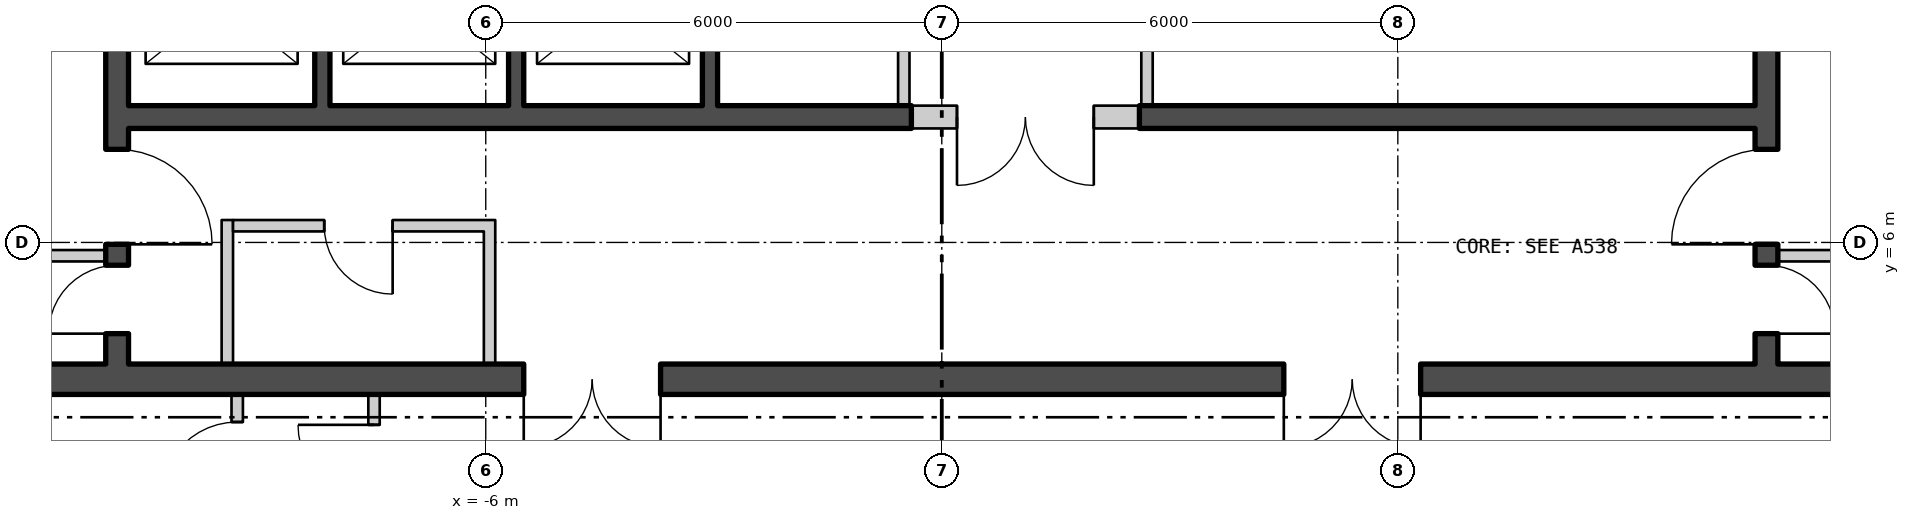
"""IFC4 building model, lengths in metres.
Left out: names, types, materials, properties, quantities, classifications, styles, units other than length and angle.
Written with IfcOpenShell. Run it as: python <this file> out.ifc"""

import sys

from ifc_helpers import new_model, si_unit, direction, frame, frame_2d, origin, place, context, subcontext, project, spatial, polyline, rectangle, outline, extrude, element, fill, save


model = new_model("IFC4")
c1 = context("Model", 3, precision=1e-05, world=origin(), true_north=direction((0.0, 1.0)))
c2 = subcontext(c1, "Body", "Model", "MODEL_VIEW")
j1 = project(units=[si_unit("LENGTHUNIT", "METRE"), si_unit("PLANEANGLEUNIT", "RADIAN")], contexts=[c1])
p1 = place(None, origin())
s1 = spatial("IfcSite", under=j1, at=p1, CompositionType="ELEMENT")
p2 = place(p1, origin())
s2 = spatial("IfcBuilding", under=s1, at=p2, CompositionType="ELEMENT")
p3 = place(p2, frame((0.0, 0.0, 321.0)))
s3 = spatial("IfcBuildingStorey", under=s2, at=p3, CompositionType="ELEMENT", Elevation=321.0)
p4 = place(p3, frame((-24.875, 16.493, -0.18), z_axis=(0.0, 0.0, 1.0), x_axis=(0.500000141277, -0.866025322218, 0.0)))
e1 = element("IfcWall", 1, at=p4, inside=s3, PredefinedType="SOLIDWALL", context=c2, shape_type="SweptSolid", body=[
    extrude(outline(polyline([(-0.13, -0.225), (45.86, -0.225), (45.6, 0.225), (0.13, 0.225), (-0.13, -0.225)])), origin(), (0.0, 0.0, 1.0), 3.98),
])
p5 = place(p4, frame((1.424, 0.0, 1.08)))
e2 = element("IfcOpeningElement", 2, at=p5, cuts=e1, PredefinedType="OPENING", context=c2, shape_type="SweptSolid", body=[
    extrude(rectangle(XDim=2.4, YDim=2.3, at=frame_2d((1.2, 1.15))), frame((0.0, 0.235, 0.0), z_axis=(0.0, -1.0, 0.0), x_axis=(1.0, 0.0, 0.0)), (0.0, 0.0, 1.0), 0.47),
])
p6 = place(p4, frame((5.892, 0.0, 1.08)))
e3 = element("IfcOpeningElement", 3, at=p6, cuts=e1, PredefinedType="OPENING", context=c2, shape_type="SweptSolid", body=[
    extrude(rectangle(XDim=2.4, YDim=2.3, at=frame_2d((1.2, 1.15))), frame((0.0, 0.235, 0.0), z_axis=(0.0, -1.0, 0.0), x_axis=(1.0, 0.0, 0.0)), (0.0, 0.0, 1.0), 0.47),
])
p7 = place(p4, frame((10.399, 0.0, 1.08)))
e4 = element("IfcOpeningElement", 4, at=p7, cuts=e1, PredefinedType="OPENING", context=c2, shape_type="SweptSolid", body=[
    extrude(rectangle(XDim=2.4, YDim=2.3, at=frame_2d((1.2, 1.15))), frame((0.0, 0.235, 0.0), z_axis=(0.0, -1.0, 0.0), x_axis=(1.0, 0.0, 0.0)), (0.0, 0.0, 1.0), 0.47),
])
p8 = place(p4, frame((14.905, 0.0, 1.08)))
e5 = element("IfcOpeningElement", 5, at=p8, cuts=e1, PredefinedType="OPENING", context=c2, shape_type="SweptSolid", body=[
    extrude(rectangle(XDim=2.4, YDim=2.3, at=frame_2d((1.2, 1.15))), frame((0.0, 0.235, 0.0), z_axis=(0.0, -1.0, 0.0), x_axis=(1.0, 0.0, 0.0)), (0.0, 0.0, 1.0), 0.47),
])
p9 = place(p4, frame((19.412, 0.0, 1.08)))
e6 = element("IfcOpeningElement", 6, at=p9, cuts=e1, PredefinedType="OPENING", context=c2, shape_type="SweptSolid", body=[
    extrude(rectangle(XDim=2.4, YDim=2.3, at=frame_2d((1.2, 1.15))), frame((0.0, 0.235, 0.0), z_axis=(0.0, -1.0, 0.0), x_axis=(1.0, 0.0, 0.0)), (0.0, 0.0, 1.0), 0.47),
])
p10 = place(p4, frame((23.918, 0.0, 1.08)))
e7 = element("IfcOpeningElement", 7, at=p10, cuts=e1, PredefinedType="OPENING", context=c2, shape_type="SweptSolid", body=[
    extrude(rectangle(XDim=2.4, YDim=2.3, at=frame_2d((1.2, 1.15))), frame((0.0, 0.235, 0.0), z_axis=(0.0, -1.0, 0.0), x_axis=(1.0, 0.0, 0.0)), (0.0, 0.0, 1.0), 0.47),
])
p11 = place(p4, frame((28.425, 0.0, 1.08)))
e8 = element("IfcOpeningElement", 8, at=p11, cuts=e1, PredefinedType="OPENING", context=c2, shape_type="SweptSolid", body=[
    extrude(rectangle(XDim=2.4, YDim=2.3, at=frame_2d((1.2, 1.15))), frame((0.0, 0.235, 0.0), z_axis=(0.0, -1.0, 0.0), x_axis=(1.0, 0.0, 0.0)), (0.0, 0.0, 1.0), 0.47),
])
p12 = place(p4, frame((37.438, 0.0, 1.08)))
e9 = element("IfcOpeningElement", 9, at=p12, cuts=e1, PredefinedType="OPENING", context=c2, shape_type="SweptSolid", body=[
    extrude(rectangle(XDim=2.4, YDim=2.3, at=frame_2d((1.2, 1.15))), frame((0.0, 0.235, 0.0), z_axis=(0.0, -1.0, 0.0), x_axis=(1.0, 0.0, 0.0)), (0.0, 0.0, 1.0), 0.47),
])
p13 = place(p4, frame((41.907, 0.0, 1.08)))
e10 = element("IfcOpeningElement", 10, at=p13, cuts=e1, PredefinedType="OPENING", context=c2, shape_type="SweptSolid", body=[
    extrude(rectangle(XDim=2.4, YDim=2.3, at=frame_2d((1.2, 1.15))), frame((0.0, 0.235, 0.0), z_axis=(0.0, -1.0, 0.0), x_axis=(1.0, 0.0, 0.0)), (0.0, 0.0, 1.0), 0.47),
])
p14 = place(p3, frame((2.01, -23.11, -0.18), z_axis=(0.0, 0.0, 1.0), x_axis=(0.500000141277, 0.866025322218, 0.0)))
e11 = element("IfcWall", 11, at=p14, inside=s3, PredefinedType="SOLIDWALL", context=c2, shape_type="SweptSolid", body=[
    extrude(outline(polyline([(-0.13, -0.225), (45.86, -0.225), (45.6, 0.225), (0.13, 0.225), (-0.13, -0.225)])), origin(), (0.0, 0.0, 1.0), 3.98),
])
p15 = place(p14, frame((1.424, 0.0, 1.08)))
e12 = element("IfcOpeningElement", 12, at=p15, cuts=e11, PredefinedType="OPENING", context=c2, shape_type="SweptSolid", body=[
    extrude(rectangle(XDim=2.4, YDim=2.3, at=frame_2d((1.2, 1.15))), frame((0.0, 0.235, 0.0), z_axis=(0.0, -1.0, 0.0), x_axis=(1.0, 0.0, 0.0)), (0.0, 0.0, 1.0), 0.47),
])
p16 = place(p14, frame((5.892, 0.0, 1.08)))
e13 = element("IfcOpeningElement", 13, at=p16, cuts=e11, PredefinedType="OPENING", context=c2, shape_type="SweptSolid", body=[
    extrude(rectangle(XDim=2.4, YDim=2.3, at=frame_2d((1.2, 1.15))), frame((0.0, 0.235, 0.0), z_axis=(0.0, -1.0, 0.0), x_axis=(1.0, 0.0, 0.0)), (0.0, 0.0, 1.0), 0.47),
])
p17 = place(p14, frame((14.905, 0.0, 1.08)))
e14 = element("IfcOpeningElement", 14, at=p17, cuts=e11, PredefinedType="OPENING", context=c2, shape_type="SweptSolid", body=[
    extrude(rectangle(XDim=2.4, YDim=2.3, at=frame_2d((1.2, 1.15))), frame((0.0, 0.235, 0.0), z_axis=(0.0, -1.0, 0.0), x_axis=(1.0, 0.0, 0.0)), (0.0, 0.0, 1.0), 0.47),
])
p18 = place(p14, frame((19.412, 0.0, 1.08)))
e15 = element("IfcOpeningElement", 15, at=p18, cuts=e11, PredefinedType="OPENING", context=c2, shape_type="SweptSolid", body=[
    extrude(rectangle(XDim=2.4, YDim=2.3, at=frame_2d((1.2, 1.15))), frame((0.0, 0.235, 0.0), z_axis=(0.0, -1.0, 0.0), x_axis=(1.0, 0.0, 0.0)), (0.0, 0.0, 1.0), 0.47),
])
p19 = place(p14, frame((23.918, 0.0, 1.08)))
e16 = element("IfcOpeningElement", 16, at=p19, cuts=e11, PredefinedType="OPENING", context=c2, shape_type="SweptSolid", body=[
    extrude(rectangle(XDim=2.4, YDim=2.3, at=frame_2d((1.2, 1.15))), frame((0.0, 0.235, 0.0), z_axis=(0.0, -1.0, 0.0), x_axis=(1.0, 0.0, 0.0)), (0.0, 0.0, 1.0), 0.47),
])
p20 = place(p14, frame((28.425, 0.0, 1.08)))
e17 = element("IfcOpeningElement", 17, at=p20, cuts=e11, PredefinedType="OPENING", context=c2, shape_type="SweptSolid", body=[
    extrude(rectangle(XDim=2.4, YDim=2.3, at=frame_2d((1.2, 1.15))), frame((0.0, 0.235, 0.0), z_axis=(0.0, -1.0, 0.0), x_axis=(1.0, 0.0, 0.0)), (0.0, 0.0, 1.0), 0.47),
])
p21 = place(p14, frame((37.438, 0.0, 1.08)))
e18 = element("IfcOpeningElement", 18, at=p21, cuts=e11, PredefinedType="OPENING", context=c2, shape_type="SweptSolid", body=[
    extrude(rectangle(XDim=2.4, YDim=2.3, at=frame_2d((1.2, 1.15))), frame((0.0, 0.235, 0.0), z_axis=(0.0, -1.0, 0.0), x_axis=(1.0, 0.0, 0.0)), (0.0, 0.0, 1.0), 0.47),
])
p22 = place(p14, frame((41.907, 0.0, 1.08)))
e19 = element("IfcOpeningElement", 19, at=p22, cuts=e11, PredefinedType="OPENING", context=c2, shape_type="SweptSolid", body=[
    extrude(rectangle(XDim=2.4, YDim=2.3, at=frame_2d((1.2, 1.15))), frame((0.0, 0.235, 0.0), z_axis=(0.0, -1.0, 0.0), x_axis=(1.0, 0.0, 0.0)), (0.0, 0.0, 1.0), 0.47),
])
p23 = place(p3, frame((-14.5, 4.2, 0.0), z_axis=(0.0, 0.0, 1.0), x_axis=(1.0, 0.0, 0.0)))
e20 = element("IfcWall", 20, at=p23, inside=s3, PredefinedType="SHEAR", context=c2, shape_type="SweptSolid", body=[
    extrude(rectangle(XDim=29.0, YDim=0.4, at=frame_2d((14.5, 0.0))), origin(), (0.0, 0.0, 1.0), 4.0),
])
p24 = place(p23, frame((9.0, 0.0, 0.0)))
e21 = element("IfcOpeningElement", 21, at=p24, cuts=e20, PredefinedType="OPENING", context=c2, shape_type="SweptSolid", body=[
    extrude(rectangle(XDim=1.8, YDim=2.4, at=frame_2d((0.9, 1.2))), frame((0.0, 0.21, 0.0), z_axis=(0.0, -1.0, 0.0), x_axis=(1.0, 0.0, 0.0)), (0.0, 0.0, 1.0), 0.42),
])
p25 = place(p23, frame((19.0, 0.0, 0.0)))
e22 = element("IfcOpeningElement", 22, at=p25, cuts=e20, PredefinedType="OPENING", context=c2, shape_type="SweptSolid", body=[
    extrude(rectangle(XDim=1.8, YDim=2.4, at=frame_2d((0.9, 1.2))), frame((0.0, 0.21, 0.0), z_axis=(0.0, -1.0, 0.0), x_axis=(1.0, 0.0, 0.0)), (0.0, 0.0, 1.0), 0.42),
])
p26 = place(p3, frame((-10.85, 4.4, 0.0), z_axis=(0.0, 0.0, 1.0), x_axis=(0.0, 1.0, 0.0)))
e23 = element("IfcWall", 23, at=p26, inside=s3, PredefinedType="SHEAR", context=c2, shape_type="SweptSolid", body=[
    extrude(rectangle(XDim=13.2, YDim=0.3, at=frame_2d((6.6, 0.0))), origin(), (0.0, 0.0, 1.0), 4.0),
])
p27 = place(p26, frame((1.575, 0.0, 0.0)))
e24 = element("IfcOpeningElement", 24, at=p27, cuts=e23, PredefinedType="OPENING", context=c2, shape_type="SweptSolid", body=[
    extrude(rectangle(XDim=1.25, YDim=2.1, at=frame_2d((0.625, 1.05))), frame((0.0, 0.16, 0.0), z_axis=(0.0, -1.0, 0.0), x_axis=(1.0, 0.0, 0.0)), (0.0, 0.0, 1.0), 0.32),
])
p28 = place(p26, frame((0.4, 0.0, 0.0)))
e25 = element("IfcOpeningElement", 25, at=p28, cuts=e23, PredefinedType="OPENING", context=c2, shape_type="SweptSolid", body=[
    extrude(rectangle(XDim=0.9, YDim=2.1, at=frame_2d((0.45, 1.05))), frame((0.0, 0.16, 0.0), z_axis=(0.0, -1.0, 0.0), x_axis=(1.0, 0.0, 0.0)), (0.0, 0.0, 1.0), 0.32),
])
p29 = place(p3, frame((10.85, 4.4, 0.0), z_axis=(0.0, 0.0, 1.0), x_axis=(0.0, 1.0, 0.0)))
e26 = element("IfcWall", 26, at=p29, inside=s3, PredefinedType="SHEAR", context=c2, shape_type="SweptSolid", body=[
    extrude(rectangle(XDim=13.2, YDim=0.3, at=frame_2d((6.6, 0.0))), origin(), (0.0, 0.0, 1.0), 4.0),
])
p30 = place(p29, frame((1.575, 0.0, 0.0)))
e27 = element("IfcOpeningElement", 27, at=p30, cuts=e26, PredefinedType="OPENING", context=c2, shape_type="SweptSolid", body=[
    extrude(rectangle(XDim=1.25, YDim=2.1, at=frame_2d((0.625, 1.05))), frame((0.0, 0.16, 0.0), z_axis=(0.0, -1.0, 0.0), x_axis=(1.0, 0.0, 0.0)), (0.0, 0.0, 1.0), 0.32),
])
p31 = place(p29, frame((0.4, 0.0, 0.0)))
e28 = element("IfcOpeningElement", 28, at=p31, cuts=e26, PredefinedType="OPENING", context=c2, shape_type="SweptSolid", body=[
    extrude(rectangle(XDim=0.9, YDim=2.1, at=frame_2d((0.45, 1.05))), frame((0.0, 0.16, 0.0), z_axis=(0.0, -1.0, 0.0), x_axis=(1.0, 0.0, 0.0)), (0.0, 0.0, 1.0), 0.32),
])
p32 = place(p3, frame((-10.7, 7.65, 0.0), z_axis=(0.0, 0.0, 1.0), x_axis=(1.0, 0.0, 0.0)))
e29 = element("IfcWall", 29, at=p32, inside=s3, PredefinedType="SHEAR", context=c2, shape_type="SweptSolid", body=[
    extrude(rectangle(XDim=10.3, YDim=0.3, at=frame_2d((5.15, 0.0))), origin(), (0.0, 0.0, 1.0), 4.0),
])
p33 = place(p3, frame((2.6, 7.65, 0.0), z_axis=(0.0, 0.0, 1.0), x_axis=(1.0, 0.0, 0.0)))
e30 = element("IfcWall", 30, at=p33, inside=s3, PredefinedType="SHEAR", context=c2, shape_type="SweptSolid", body=[
    extrude(rectangle(XDim=8.1, YDim=0.3, at=frame_2d((4.05, 0.0))), origin(), (0.0, 0.0, 1.0), 4.0),
])
for number, where, z_axis, x_axis in (
    (31, (-8.15, 7.8, 0.0), (0.0, 0.0, 1.0), (0.0, 1.0, 0.0)),
    (32, (-5.6, 7.8, 0.0), (0.0, 0.0, 1.0), (0.0, 1.0, 0.0)),
    (33, (-3.05, 7.8, 0.0), (0.0, 0.0, 1.0), (0.0, 1.0, 0.0)),
):
    element("IfcWall", number, at=place(p3, frame(where, z_axis=z_axis, x_axis=x_axis)), inside=s3, PredefinedType="SHEAR", context=c2, shape_type="SweptSolid", body=[
        extrude(rectangle(XDim=2.7, YDim=0.2, at=frame_2d((1.35, 0.0))), origin(), (0.0, 0.0, 1.0), 4.0),
    ])
for number, where, z_axis, x_axis in (
    (34, (-0.5, 7.8, 0.0), (0.0, 0.0, 1.0), (0.0, 1.0, 0.0)),
    (35, (2.7, 7.8, 0.0), (0.0, 0.0, 1.0), (0.0, 1.0, 0.0)),
):
    element("IfcWall", number, at=place(p3, frame(where, z_axis=z_axis, x_axis=x_axis)), inside=s3, PredefinedType="PARTITIONING", context=c2, shape_type="SweptSolid", body=[
        extrude(rectangle(XDim=2.7, YDim=0.15, at=frame_2d((1.35, 0.0))), origin(), (0.0, 0.0, 1.0), 4.0),
    ])
for number, where, z_axis, x_axis in (
    (36, (-14.1, 5.825, 0.0), (0.0, 0.0, 1.0), (1.0, 0.0, 0.0)),
    (37, (11.0, 5.825, 0.0), (0.0, 0.0, 1.0), (1.0, 0.0, 0.0)),
):
    element("IfcWall", number, at=place(p3, frame(where, z_axis=z_axis, x_axis=x_axis)), inside=s3, PredefinedType="PARTITIONING", context=c2, shape_type="SweptSolid", body=[
        extrude(rectangle(XDim=3.1, YDim=0.15, at=frame_2d((1.55, 0.0))), origin(), (0.0, 0.0, 1.0), 4.0),
    ])
for number, where, z_axis, x_axis in (
    (38, (-9.4, 4.4, 0.0), (0.0, 0.0, 1.0), (0.0, 1.0, 0.0)),
    (39, (-5.95, 4.4, 0.0), (0.0, 0.0, 1.0), (0.0, 1.0, 0.0)),
):
    element("IfcWall", number, at=place(p3, frame(where, z_axis=z_axis, x_axis=x_axis)), inside=s3, PredefinedType="PARTITIONING", context=c2, shape_type="SweptSolid", body=[
        extrude(rectangle(XDim=1.895, YDim=0.15, at=frame_2d((0.948, 0.0))), origin(), (0.0, 0.0, 1.0), 4.0),
    ])
p34 = place(p3, frame((-9.325, 6.22, 0.0), z_axis=(0.0, 0.0, 1.0), x_axis=(1.0, 0.0, 0.0)))
e40 = element("IfcWall", 40, at=p34, inside=s3, PredefinedType="PARTITIONING", context=c2, shape_type="SweptSolid", body=[
    extrude(rectangle(XDim=3.3, YDim=0.15, at=frame_2d((1.65, 0.0))), origin(), (0.0, 0.0, 1.0), 4.0),
])
p35 = place(p34, frame((1.2, 0.0, 0.0)))
e41 = element("IfcOpeningElement", 41, at=p35, cuts=e40, PredefinedType="OPENING", context=c2, shape_type="SweptSolid", body=[
    extrude(rectangle(XDim=0.9, YDim=2.1, at=frame_2d((0.45, 1.05))), frame((0.0, 0.085, 0.0), z_axis=(0.0, -1.0, 0.0), x_axis=(1.0, 0.0, 0.0)), (0.0, 0.0, 1.0), 0.17),
])
p36 = place(p3, frame((-0.4, 7.65, 0.0), z_axis=(0.0, 0.0, 1.0), x_axis=(1.0, 0.0, 0.0)))
e42 = element("IfcWall", 42, at=p36, inside=s3, PredefinedType="PARTITIONING", context=c2, shape_type="SweptSolid", body=[
    extrude(rectangle(XDim=3.0, YDim=0.3, at=frame_2d((1.5, 0.0))), origin(), (0.0, 0.0, 1.0), 4.0),
])
p37 = place(p36, frame((0.6, 0.0, 0.0)))
e43 = element("IfcOpeningElement", 43, at=p37, cuts=e42, PredefinedType="OPENING", context=c2, shape_type="SweptSolid", body=[
    extrude(rectangle(XDim=1.8, YDim=2.4, at=frame_2d((0.9, 1.2))), frame((0.0, 0.16, 0.0), z_axis=(0.0, -1.0, 0.0), x_axis=(1.0, 0.0, 0.0)), (0.0, 0.0, 1.0), 0.32),
])
p38 = place(p3, frame((-9.27, 2.275, 0.0), z_axis=(0.0, 0.0, 1.0), x_axis=(0.0, 1.0, 0.0)))
e44 = element("IfcWall", 44, at=p38, inside=s3, PredefinedType="PARTITIONING", context=c2, shape_type="SweptSolid", body=[
    extrude(rectangle(XDim=1.725, YDim=0.15, at=frame_2d((0.863, 0.0))), origin(), (0.0, 0.0, 1.0), 4.0),
])
p39 = place(p38, frame((0.362, 0.0, 0.0)))
e45 = element("IfcOpeningElement", 45, at=p39, cuts=e44, PredefinedType="OPENING", context=c2, shape_type="SweptSolid", body=[
    extrude(rectangle(XDim=1.0, YDim=2.1, at=frame_2d((0.5, 1.05))), frame((0.0, 0.085, 0.0), z_axis=(0.0, -1.0, 0.0), x_axis=(1.0, 0.0, 0.0)), (0.0, 0.0, 1.0), 0.17),
])
p40 = place(p3, frame((-7.47, -13.203, 0.0), z_axis=(0.0, 0.0, 1.0), x_axis=(0.0, 1.0, 0.0)))
e46 = element("IfcWall", 46, at=p40, inside=s3, PredefinedType="PARTITIONING", context=c2, shape_type="SweptSolid", body=[
    extrude(rectangle(XDim=17.203, YDim=0.15, at=frame_2d((8.601, 0.0))), origin(), (0.0, 0.0, 1.0), 4.0),
])
p41 = place(p40, frame((3.519, 0.0, 0.0)))
e47 = element("IfcOpeningElement", 47, at=p41, cuts=e46, PredefinedType="OPENING", context=c2, shape_type="SweptSolid", body=[
    extrude(rectangle(XDim=1.0, YDim=2.1, at=frame_2d((0.5, 1.05))), frame((0.0, 0.085, 0.0), z_axis=(0.0, -1.0, 0.0), x_axis=(1.0, 0.0, 0.0)), (0.0, 0.0, 1.0), 0.17),
])
p42 = place(p40, frame((15.803, 0.0, 0.0)))
e48 = element("IfcOpeningElement", 48, at=p42, cuts=e46, PredefinedType="OPENING", context=c2, shape_type="SweptSolid", body=[
    extrude(rectangle(XDim=1.0, YDim=2.1, at=frame_2d((0.5, 1.05))), frame((0.0, 0.085, 0.0), z_axis=(0.0, -1.0, 0.0), x_axis=(1.0, 0.0, 0.0)), (0.0, 0.0, 1.0), 0.17),
])
p43 = place(p27, origin())
e49 = element("IfcDoor", 49, at=p43, inside=s3, OperationType="SINGLE_SWING_LEFT", PredefinedType="DOOR", context=c2, shape_type="SweptSolid", body=[
    extrude(rectangle(XDim=1.25, YDim=2.1, at=frame_2d((0.625, 1.05))), frame((0.0, 0.025, 0.0), z_axis=(0.0, -1.0, 0.0), x_axis=(1.0, 0.0, 0.0)), (0.0, 0.0, 1.0), 0.05),
])
fill(e24, e49)
p44 = place(p28, origin())
e50 = element("IfcDoor", 50, at=p44, inside=s3, OperationType="SINGLE_SWING_RIGHT", PredefinedType="DOOR", context=c2, shape_type="SweptSolid", body=[
    extrude(rectangle(XDim=0.9, YDim=2.1, at=frame_2d((0.45, 1.05))), frame((0.0, 0.025, 0.0), z_axis=(0.0, -1.0, 0.0), x_axis=(1.0, 0.0, 0.0)), (0.0, 0.0, 1.0), 0.05),
])
fill(e25, e50)
p45 = place(p30, origin())
e51 = element("IfcDoor", 51, at=p45, inside=s3, OperationType="SINGLE_SWING_RIGHT", PredefinedType="DOOR", context=c2, shape_type="SweptSolid", body=[
    extrude(rectangle(XDim=1.25, YDim=2.1, at=frame_2d((0.625, 1.05))), frame((0.0, 0.025, 0.0), z_axis=(0.0, -1.0, 0.0), x_axis=(1.0, 0.0, 0.0)), (0.0, 0.0, 1.0), 0.05),
])
fill(e27, e51)
p46 = place(p31, origin())
e52 = element("IfcDoor", 52, at=p46, inside=s3, OperationType="SINGLE_SWING_LEFT", PredefinedType="DOOR", context=c2, shape_type="SweptSolid", body=[
    extrude(rectangle(XDim=0.9, YDim=2.1, at=frame_2d((0.45, 1.05))), frame((0.0, 0.025, 0.0), z_axis=(0.0, -1.0, 0.0), x_axis=(1.0, 0.0, 0.0)), (0.0, 0.0, 1.0), 0.05),
])
fill(e28, e52)
p47 = place(p35, origin())
e53 = element("IfcDoor", 53, at=p47, inside=s3, OperationType="SINGLE_SWING_RIGHT", PredefinedType="DOOR", context=c2, shape_type="SweptSolid", body=[
    extrude(rectangle(XDim=0.9, YDim=2.1, at=frame_2d((0.45, 1.05))), frame((0.0, 0.025, 0.0), z_axis=(0.0, -1.0, 0.0), x_axis=(1.0, 0.0, 0.0)), (0.0, 0.0, 1.0), 0.05),
])
fill(e41, e53)
p48 = place(p37, origin())
e54 = element("IfcDoor", 54, at=p48, inside=s3, OperationType="DOUBLE_DOOR_SINGLE_SWING", PredefinedType="DOOR", context=c2, shape_type="SweptSolid", body=[
    extrude(rectangle(XDim=1.8, YDim=2.4, at=frame_2d((0.9, 1.2))), frame((0.0, 0.025, 0.0), z_axis=(0.0, -1.0, 0.0), x_axis=(1.0, 0.0, 0.0)), (0.0, 0.0, 1.0), 0.05),
])
fill(e43, e54)
p49 = place(p24, origin())
e55 = element("IfcDoor", 55, at=p49, inside=s3, OperationType="DOUBLE_DOOR_SINGLE_SWING", PredefinedType="DOOR", context=c2, shape_type="SweptSolid", body=[
    extrude(rectangle(XDim=1.8, YDim=2.4, at=frame_2d((0.9, 1.2))), frame((0.0, 0.025, 0.0), z_axis=(0.0, -1.0, 0.0), x_axis=(1.0, 0.0, 0.0)), (0.0, 0.0, 1.0), 0.05),
])
fill(e21, e55)
p50 = place(p25, origin())
e56 = element("IfcDoor", 56, at=p50, inside=s3, OperationType="DOUBLE_DOOR_SINGLE_SWING", PredefinedType="DOOR", context=c2, shape_type="SweptSolid", body=[
    extrude(rectangle(XDim=1.8, YDim=2.4, at=frame_2d((0.9, 1.2))), frame((0.0, 0.025, 0.0), z_axis=(0.0, -1.0, 0.0), x_axis=(1.0, 0.0, 0.0)), (0.0, 0.0, 1.0), 0.05),
])
fill(e22, e56)
p51 = place(p39, origin())
e57 = element("IfcDoor", 57, at=p51, inside=s3, OperationType="SINGLE_SWING_RIGHT", PredefinedType="DOOR", context=c2, shape_type="SweptSolid", body=[
    extrude(rectangle(XDim=1.0, YDim=2.1, at=frame_2d((0.5, 1.05))), frame((0.0, 0.025, 0.0), z_axis=(0.0, -1.0, 0.0), x_axis=(1.0, 0.0, 0.0)), (0.0, 0.0, 1.0), 0.05),
])
fill(e45, e57)
p52 = place(p42, origin())
e58 = element("IfcDoor", 58, at=p52, inside=s3, OperationType="SINGLE_SWING_LEFT", PredefinedType="DOOR", context=c2, shape_type="SweptSolid", body=[
    extrude(rectangle(XDim=1.0, YDim=2.1, at=frame_2d((0.5, 1.05))), frame((0.0, 0.025, 0.0), z_axis=(0.0, -1.0, 0.0), x_axis=(1.0, 0.0, 0.0)), (0.0, 0.0, 1.0), 0.05),
])
fill(e48, e58)
save(model, sys.argv[1])
